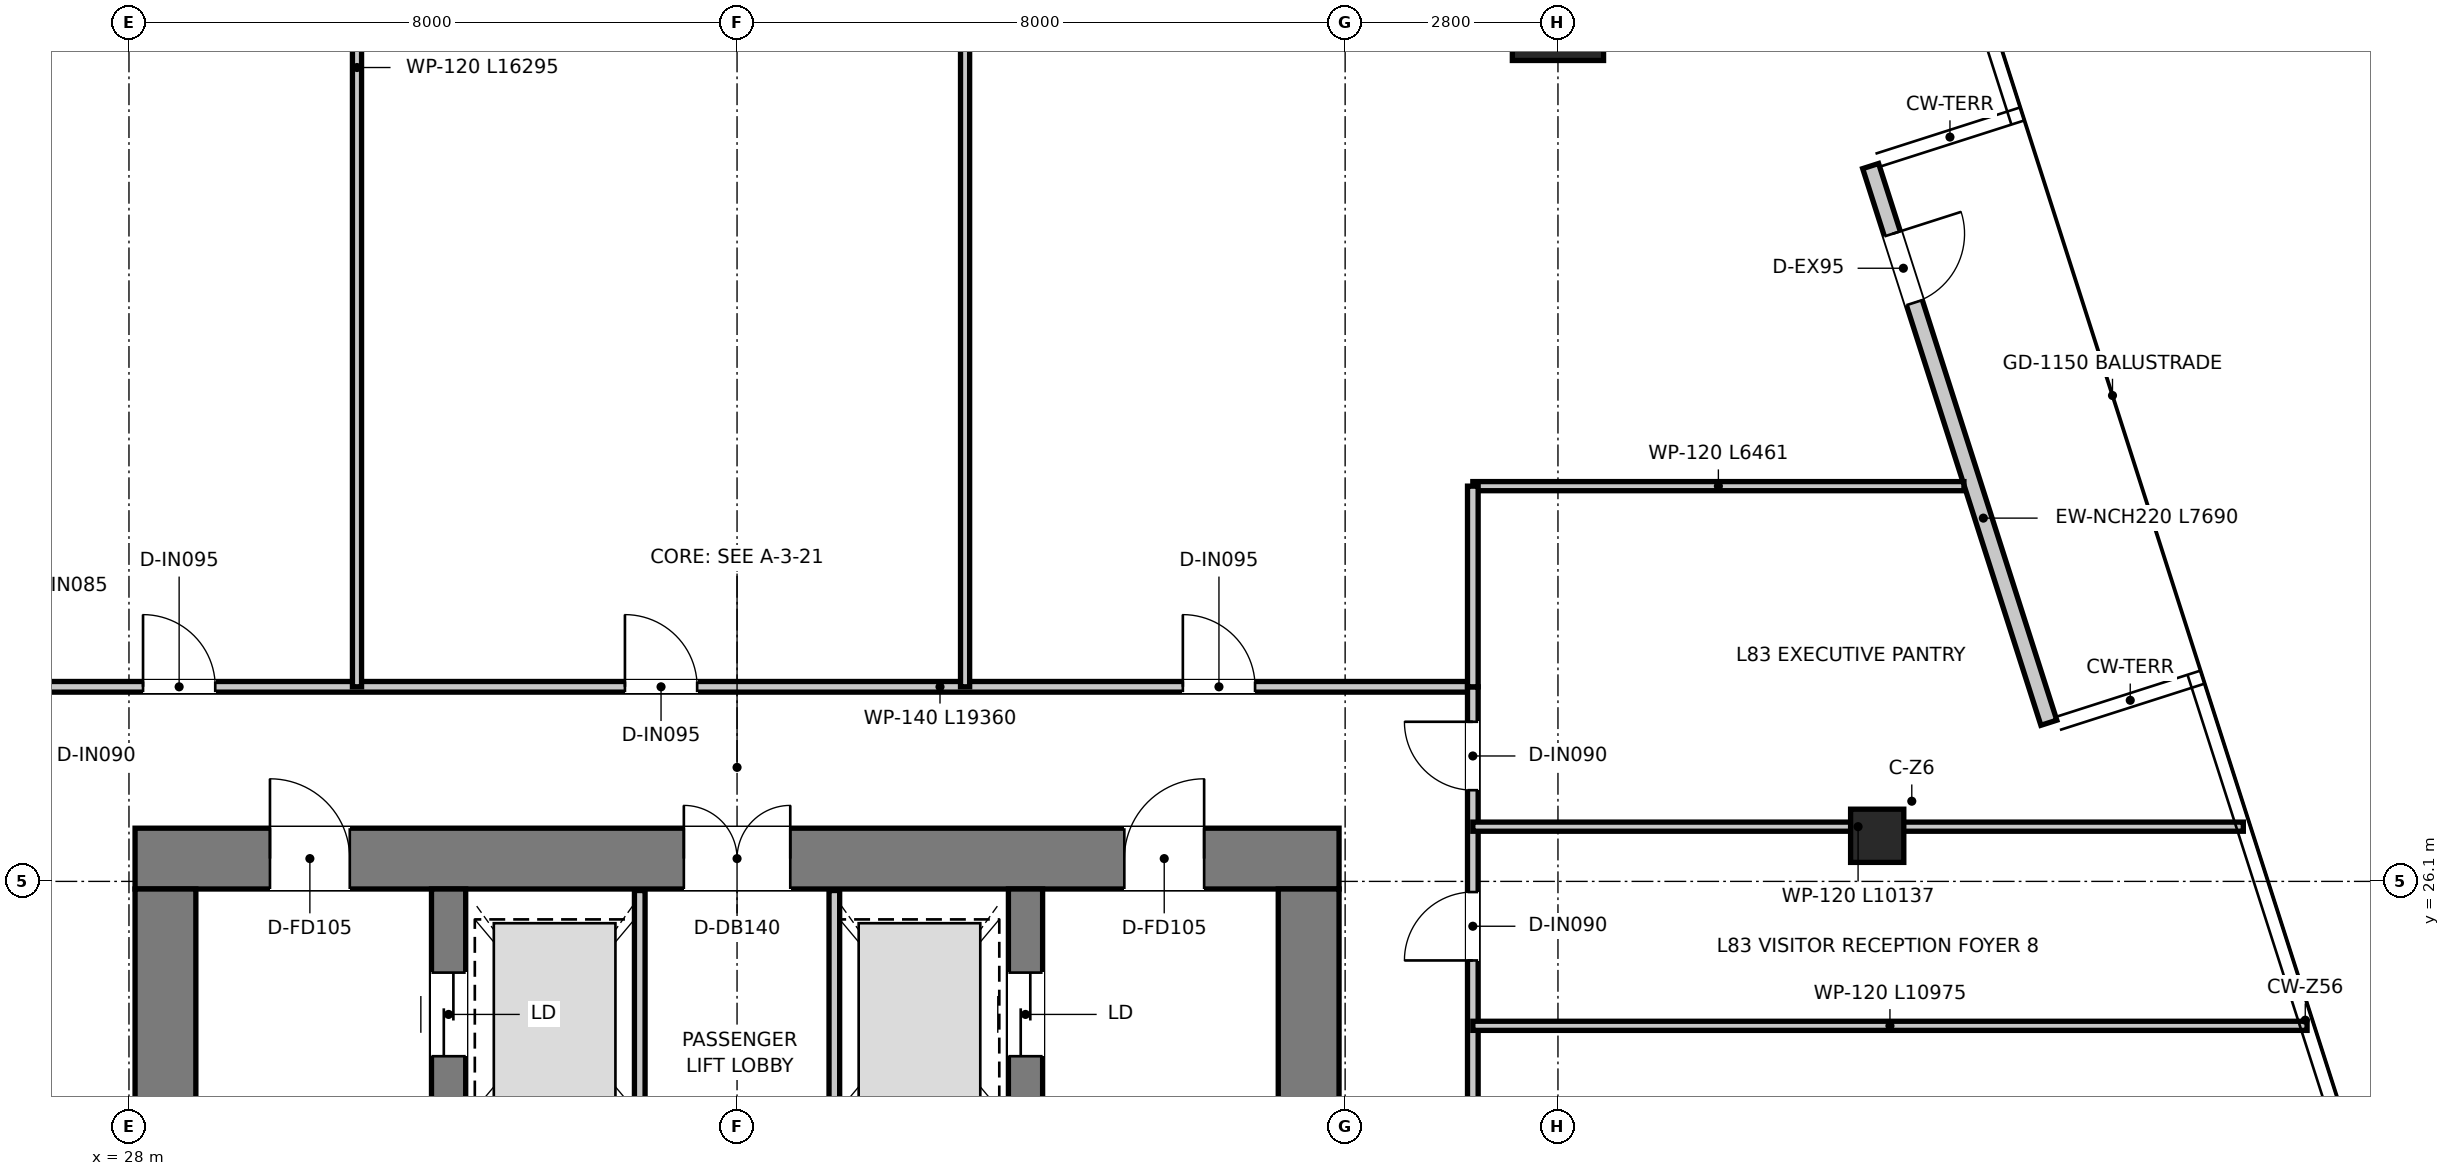
"""IFC4 building model, lengths in metres.
Left out: names, types, materials, properties, quantities, classifications, styles, units other than length and angle.
Written with IfcOpenShell. Run it as: python <this file> out.ifc"""

import sys

from ifc_helpers import new_model, si_unit, direction, frame, frame_2d, origin, origin_2d, place, context, subcontext, project, spatial, rectangle, extrude, source, transform, mapped, element, fill, save


model = new_model("IFC4")
c1 = context("Model", 3, precision=1e-05, world=origin(), true_north=direction((0.0, 1.0)))
c2 = subcontext(c1, "Body", "Model", "MODEL_VIEW")
j1 = project(units=[si_unit("LENGTHUNIT", "METRE"), si_unit("PLANEANGLEUNIT", "RADIAN")], contexts=[c1])
p1 = place(None, origin())
s1 = spatial("IfcSite", under=j1, at=p1, CompositionType="ELEMENT")
p2 = place(p1, origin())
s2 = spatial("IfcBuilding", under=s1, at=p2, CompositionType="ELEMENT")
p3 = place(p2, frame((0.0, 0.0, 339.55)))
s3 = spatial("IfcBuildingStorey", under=s2, at=p3, CompositionType="ELEMENT", Elevation=339.55)
p4 = place(p3, frame((28.08, 26.4, 0.0), z_axis=(0.0, 0.0, 1.0), x_axis=(1.0, 0.0, 0.0)))
e1 = element("IfcWall", 1, at=p4, inside=s3, PredefinedType="SHEAR", context=c2, shape_type="SweptSolid", body=[
    extrude(rectangle(XDim=15.84, YDim=0.8, at=frame_2d((7.92, 0.0))), origin(), (0.0, 0.0, 1.0), 3.95),
])
p5 = place(p4, frame((7.22, 0.0, 0.0)))
e2 = element("IfcOpeningElement", 2, at=p5, cuts=e1, PredefinedType="OPENING", context=c2, shape_type="SweptSolid", body=[
    extrude(rectangle(XDim=1.4, YDim=2.2, at=frame_2d((0.7, 1.1))), frame((0.0, 0.41, 0.0), z_axis=(0.0, -1.0, 0.0), x_axis=(1.0, 0.0, 0.0)), (0.0, 0.0, 1.0), 0.82),
])
p6 = place(p4, frame((1.775, 0.0, 0.0)))
e3 = element("IfcOpeningElement", 3, at=p6, cuts=e1, PredefinedType="OPENING", context=c2, shape_type="SweptSolid", body=[
    extrude(rectangle(XDim=1.05, YDim=2.1, at=frame_2d((0.525, 1.05))), frame((0.0, 0.41, 0.0), z_axis=(0.0, -1.0, 0.0), x_axis=(1.0, 0.0, 0.0)), (0.0, 0.0, 1.0), 0.82),
])
p7 = place(p4, frame((13.015, 0.0, 0.0)))
e4 = element("IfcOpeningElement", 4, at=p7, cuts=e1, PredefinedType="OPENING", context=c2, shape_type="SweptSolid", body=[
    extrude(rectangle(XDim=1.05, YDim=2.1, at=frame_2d((0.525, 1.05))), frame((0.0, 0.41, 0.0), z_axis=(0.0, -1.0, 0.0), x_axis=(1.0, 0.0, 0.0)), (0.0, 0.0, 1.0), 0.82),
])
for number, where, z_axis, x_axis in (
    (5, (28.48, 11.3, 0.0), (0.0, 0.0, 1.0), (0.0, 1.0, 0.0)),
    (6, (43.52, 11.3, 0.0), (0.0, 0.0, 1.0), (0.0, 1.0, 0.0)),
):
    element("IfcWall", number, at=place(p3, frame(where, z_axis=z_axis, x_axis=x_axis)), inside=s3, PredefinedType="SHEAR", context=c2, shape_type="SweptSolid", body=[
        extrude(rectangle(XDim=14.7, YDim=0.8, at=frame_2d((7.35, 0.0))), origin(), (0.0, 0.0, 1.0), 3.95),
    ])
p8 = place(p3, frame((32.205, 13.22, 0.0), z_axis=(0.0, 0.0, 1.0), x_axis=(0.0, 1.0, 0.0)))
e7 = element("IfcWall", 7, at=p8, inside=s3, PredefinedType="SHEAR", context=c2, shape_type="SweptSolid", body=[
    extrude(rectangle(XDim=12.78, YDim=0.45, at=frame_2d((6.39, 0.0))), origin(), (0.0, 0.0, 1.0), 3.95),
])
p9 = place(p8, frame((10.58, 0.0, 0.0)))
e8 = element("IfcOpeningElement", 8, at=p9, cuts=e7, PredefinedType="OPENING", context=c2, shape_type="SweptSolid", body=[
    extrude(rectangle(XDim=1.1, YDim=2.15, at=frame_2d((0.55, 1.075))), frame((0.0, 0.235, 0.0), z_axis=(0.0, -1.0, 0.0), x_axis=(1.0, 0.0, 0.0)), (0.0, 0.0, 1.0), 0.47),
])
p10 = place(p3, frame((39.795, 13.22, 0.0), z_axis=(0.0, 0.0, 1.0), x_axis=(0.0, 1.0, 0.0)))
e9 = element("IfcWall", 9, at=p10, inside=s3, PredefinedType="SHEAR", context=c2, shape_type="SweptSolid", body=[
    extrude(rectangle(XDim=12.78, YDim=0.45, at=frame_2d((6.39, 0.0))), origin(), (0.0, 0.0, 1.0), 3.95),
])
p11 = place(p10, frame((10.58, 0.0, 0.0)))
e10 = element("IfcOpeningElement", 10, at=p11, cuts=e9, PredefinedType="OPENING", context=c2, shape_type="SweptSolid", body=[
    extrude(rectangle(XDim=1.1, YDim=2.15, at=frame_2d((0.55, 1.075))), frame((0.0, 0.235, 0.0), z_axis=(0.0, -1.0, 0.0), x_axis=(1.0, 0.0, 0.0)), (0.0, 0.0, 1.0), 0.47),
])
m1 = source(origin(), c2, "Body", "SweptSolid", [
    extrude(rectangle(XDim=1.2, YDim=1.2, at=origin_2d()), origin(), (0.0, 0.0, 1.0), 3.95),
])
p12 = place(p3, frame((46.8, 37.5, 0.0), z_axis=(0.0, 0.0, 1.0), x_axis=(1.0, 0.0, 0.0)))
e11 = element("IfcColumn", 11, at=p12, inside=s3, PredefinedType="USERDEFINED", context=c2, shape_type="MappedRepresentation", body=[
    mapped(m1, transform((0.0, 0.0, 0.0), x_axis=(1.0, 0.0, 0.0), y_axis=(0.0, 1.0, 0.0), z_axis=(0.0, 0.0, 1.0), scale=1.0)),
])
m2 = source(origin(), c2, "Body", "SweptSolid", [
    extrude(rectangle(XDim=0.7, YDim=0.7, at=origin_2d()), origin(), (0.0, 0.0, 1.0), 3.95),
])
p13 = place(p3, frame((51.0, 26.7, 0.0), z_axis=(0.0, 0.0, 1.0), x_axis=(1.0, 0.0, 0.0)))
e12 = element("IfcColumn", 12, at=p13, inside=s3, PredefinedType="COLUMN", context=c2, shape_type="MappedRepresentation", body=[
    mapped(m2, transform((0.0, 0.0, 0.0), x_axis=(1.0, 0.0, 0.0), y_axis=(0.0, 1.0, 0.0), z_axis=(0.0, 0.0, 1.0), scale=1.0)),
])
p14 = place(p3, frame((50.914, 35.511, 0.0), z_axis=(0.0, 0.0, 1.0), x_axis=(0.304842539612, -0.952402764613, 0.0)))
e13 = element("IfcWall", 13, at=p14, inside=s3, PredefinedType="ELEMENTEDWALL", context=c2, shape_type="SweptSolid", body=[
    extrude(rectangle(XDim=7.69, YDim=0.22, at=frame_2d((3.845, 0.0))), origin(), (0.0, 0.0, 1.0), 3.38),
])
p15 = place(p14, frame((0.937, 0.0, 0.0)))
e14 = element("IfcOpeningElement", 14, at=p15, cuts=e13, PredefinedType="OPENING", context=c2, shape_type="SweptSolid", body=[
    extrude(rectangle(XDim=0.95, YDim=2.1, at=frame_2d((0.475, 1.05))), frame((0.0, 0.12, 0.0), z_axis=(0.0, -1.0, 0.0), x_axis=(1.0, 0.0, 0.0)), (0.0, 0.0, 1.0), 0.24),
])
p16 = place(p3, frame((34.72, 20.2, 0.0), z_axis=(0.0, 0.0, 1.0), x_axis=(0.0, 1.0, 0.0)))
e15 = element("IfcWall", 15, at=p16, inside=s3, PredefinedType="PARTITIONING", context=c2, shape_type="SweptSolid", body=[
    extrude(rectangle(XDim=5.78, YDim=0.14, at=frame_2d((2.89, 0.0))), origin(), (0.0, 0.0, 1.0), 2.82),
])
p17 = place(p16, frame((1.05, 0.0, 0.0)))
e16 = element("IfcOpeningElement", 16, at=p17, cuts=e15, PredefinedType="OPENING", context=c2, shape_type="SweptSolid", body=[
    extrude(rectangle(XDim=0.9, YDim=2.1, at=frame_2d((0.45, 1.05))), frame((0.0, 0.08, 0.0), z_axis=(0.0, -1.0, 0.0), x_axis=(1.0, 0.0, 0.0)), (0.0, 0.0, 1.0), 0.16),
])
p18 = place(p3, frame((37.28, 20.2, 0.0), z_axis=(0.0, 0.0, 1.0), x_axis=(0.0, 1.0, 0.0)))
e17 = element("IfcWall", 17, at=p18, inside=s3, PredefinedType="PARTITIONING", context=c2, shape_type="SweptSolid", body=[
    extrude(rectangle(XDim=5.78, YDim=0.14, at=frame_2d((2.89, 0.0))), origin(), (0.0, 0.0, 1.0), 2.82),
])
p19 = place(p18, frame((0.95, 0.0, 0.0)))
e18 = element("IfcOpeningElement", 18, at=p19, cuts=e17, PredefinedType="OPENING", context=c2, shape_type="SweptSolid", body=[
    extrude(rectangle(XDim=1.1, YDim=2.15, at=frame_2d((0.55, 1.075))), frame((0.0, 0.08, 0.0), z_axis=(0.0, -1.0, 0.0), x_axis=(1.0, 0.0, 0.0)), (0.0, 0.0, 1.0), 0.16),
])
p20 = place(p3, frame((26.32, 28.66, 0.0), z_axis=(0.0, 0.0, 1.0), x_axis=(1.0, 0.0, 0.0)))
e19 = element("IfcWall", 19, at=p20, inside=s3, PredefinedType="PARTITIONING", context=c2, shape_type="SweptSolid", body=[
    extrude(rectangle(XDim=19.36, YDim=0.14, at=frame_2d((9.68, 0.0))), origin(), (0.0, 0.0, 1.0), 3.18),
])
p21 = place(p20, frame((1.865, 0.0, 0.0)))
e20 = element("IfcOpeningElement", 20, at=p21, cuts=e19, PredefinedType="OPENING", context=c2, shape_type="SweptSolid", body=[
    extrude(rectangle(XDim=0.95, YDim=2.1, at=frame_2d((0.475, 1.05))), frame((0.0, 0.08, 0.0), z_axis=(0.0, -1.0, 0.0), x_axis=(1.0, 0.0, 0.0)), (0.0, 0.0, 1.0), 0.16),
])
p22 = place(p20, frame((8.205, 0.0, 0.0)))
e21 = element("IfcOpeningElement", 21, at=p22, cuts=e19, PredefinedType="OPENING", context=c2, shape_type="SweptSolid", body=[
    extrude(rectangle(XDim=0.95, YDim=2.1, at=frame_2d((0.475, 1.05))), frame((0.0, 0.08, 0.0), z_axis=(0.0, -1.0, 0.0), x_axis=(1.0, 0.0, 0.0)), (0.0, 0.0, 1.0), 0.16),
])
p23 = place(p20, frame((15.545, 0.0, 0.0)))
e22 = element("IfcOpeningElement", 22, at=p23, cuts=e19, PredefinedType="OPENING", context=c2, shape_type="SweptSolid", body=[
    extrude(rectangle(XDim=0.95, YDim=2.1, at=frame_2d((0.475, 1.05))), frame((0.0, 0.08, 0.0), z_axis=(0.0, -1.0, 0.0), x_axis=(1.0, 0.0, 0.0)), (0.0, 0.0, 1.0), 0.16),
])
p24 = place(p3, frame((45.68, 13.0, 0.0), z_axis=(0.0, 0.0, 1.0), x_axis=(0.0, 1.0, 0.0)))
e23 = element("IfcWall", 23, at=p24, inside=s3, PredefinedType="PARTITIONING", context=c2, shape_type="SweptSolid", body=[
    extrude(rectangle(XDim=15.66, YDim=0.14, at=frame_2d((7.83, 0.0))), origin(), (0.0, 0.0, 1.0), 3.13),
])
p25 = place(p24, frame((14.3, 0.0, 0.0)))
e24 = element("IfcOpeningElement", 24, at=p25, cuts=e23, PredefinedType="OPENING", context=c2, shape_type="SweptSolid", body=[
    extrude(rectangle(XDim=0.9, YDim=2.1, at=frame_2d((0.45, 1.05))), frame((0.0, 0.08, 0.0), z_axis=(0.0, -1.0, 0.0), x_axis=(1.0, 0.0, 0.0)), (0.0, 0.0, 1.0), 0.16),
])
p26 = place(p24, frame((4.9, 0.0, 0.0)))
e25 = element("IfcOpeningElement", 25, at=p26, cuts=e23, PredefinedType="OPENING", context=c2, shape_type="SweptSolid", body=[
    extrude(rectangle(XDim=0.9, YDim=2.1, at=frame_2d((0.45, 1.05))), frame((0.0, 0.08, 0.0), z_axis=(0.0, -1.0, 0.0), x_axis=(1.0, 0.0, 0.0)), (0.0, 0.0, 1.0), 0.16),
])
p27 = place(p24, frame((8.25, 0.0, 0.0)))
e26 = element("IfcOpeningElement", 26, at=p27, cuts=e23, PredefinedType="OPENING", context=c2, shape_type="SweptSolid", body=[
    extrude(rectangle(XDim=0.9, YDim=2.1, at=frame_2d((0.45, 1.05))), frame((0.0, 0.08, 0.0), z_axis=(0.0, -1.0, 0.0), x_axis=(1.0, 0.0, 0.0)), (0.0, 0.0, 1.0), 0.16),
])
p28 = place(p24, frame((12.06, 0.0, 0.0)))
e27 = element("IfcOpeningElement", 27, at=p28, cuts=e23, PredefinedType="OPENING", context=c2, shape_type="SweptSolid", body=[
    extrude(rectangle(XDim=0.9, YDim=2.1, at=frame_2d((0.45, 1.05))), frame((0.0, 0.08, 0.0), z_axis=(0.0, -1.0, 0.0), x_axis=(1.0, 0.0, 0.0)), (0.0, 0.0, 1.0), 0.16),
])
p29 = place(p3, frame((45.68, 26.82, 0.0), z_axis=(0.0, 0.0, 1.0), x_axis=(1.0, 0.0, 0.0)))
e28 = element("IfcWall", 28, at=p29, inside=s3, PredefinedType="PARTITIONING", context=c2, shape_type="SweptSolid", body=[
    extrude(rectangle(XDim=10.137, YDim=0.12, at=frame_2d((5.068, 0.0))), origin(), (0.0, 0.0, 1.0), 3.13),
])
p30 = place(p3, frame((45.68, 31.3, 0.0), z_axis=(0.0, 0.0, 1.0), x_axis=(1.0, 0.0, 0.0)))
e29 = element("IfcWall", 29, at=p30, inside=s3, PredefinedType="PARTITIONING", context=c2, shape_type="SweptSolid", body=[
    extrude(rectangle(XDim=6.461, YDim=0.12, at=frame_2d((3.23, 0.0))), origin(), (0.0, 0.0, 1.0), 3.13),
])
p31 = place(p3, frame((45.68, 28.66, 0.0), z_axis=(0.0, 0.0, 1.0), x_axis=(0.0, 1.0, 0.0)))
e30 = element("IfcWall", 30, at=p31, inside=s3, PredefinedType="PARTITIONING", context=c2, shape_type="SweptSolid", body=[
    extrude(rectangle(XDim=2.64, YDim=0.14, at=frame_2d((1.32, 0.0))), origin(), (0.0, 0.0, 1.0), 3.43),
])
p32 = place(p3, frame((31.0, 28.66, 0.0), z_axis=(0.0, 0.0, 1.0), x_axis=(0.0, 1.0, 0.0)))
e31 = element("IfcWall", 31, at=p32, inside=s3, PredefinedType="PARTITIONING", context=c2, shape_type="SweptSolid", body=[
    extrude(rectangle(XDim=16.295, YDim=0.12, at=frame_2d((8.147, 0.0))), origin(), (0.0, 0.0, 1.0), 3.13),
])
p33 = place(p3, frame((39.0, 28.66, 0.0), z_axis=(0.0, 0.0, 1.0), x_axis=(0.0, 1.0, 0.0)))
e32 = element("IfcWall", 32, at=p33, inside=s3, PredefinedType="PARTITIONING", context=c2, shape_type="SweptSolid", body=[
    extrude(rectangle(XDim=18.855, YDim=0.12, at=frame_2d((9.428, 0.0))), origin(), (0.0, 0.0, 1.0), 3.13),
])
p34 = place(p3, frame((45.68, 24.2, 0.0), z_axis=(0.0, 0.0, 1.0), x_axis=(1.0, 0.0, 0.0)))
e33 = element("IfcWall", 33, at=p34, inside=s3, PredefinedType="PARTITIONING", context=c2, shape_type="SweptSolid", body=[
    extrude(rectangle(XDim=10.976, YDim=0.12, at=frame_2d((5.488, 0.0))), origin(), (0.0, 0.0, 1.0), 3.13),
])
p35 = place(p5, origin())
e34 = element("IfcDoor", 34, at=p35, inside=s3, OperationType="DOUBLE_DOOR_SINGLE_SWING", PredefinedType="DOOR", context=c2, shape_type="SweptSolid", body=[
    extrude(rectangle(XDim=1.4, YDim=2.2, at=frame_2d((0.7, 1.1))), frame((0.0, 0.025, 0.0), z_axis=(0.0, -1.0, 0.0), x_axis=(1.0, 0.0, 0.0)), (0.0, 0.0, 1.0), 0.05),
])
fill(e2, e34)
p36 = place(p6, origin())
e35 = element("IfcDoor", 35, at=p36, inside=s3, OperationType="SINGLE_SWING_LEFT", PredefinedType="DOOR", context=c2, shape_type="SweptSolid", body=[
    extrude(rectangle(XDim=1.05, YDim=2.1, at=frame_2d((0.525, 1.05))), frame((0.0, 0.025, 0.0), z_axis=(0.0, -1.0, 0.0), x_axis=(1.0, 0.0, 0.0)), (0.0, 0.0, 1.0), 0.05),
])
fill(e3, e35)
p37 = place(p7, origin())
e36 = element("IfcDoor", 36, at=p37, inside=s3, OperationType="SINGLE_SWING_RIGHT", PredefinedType="DOOR", context=c2, shape_type="SweptSolid", body=[
    extrude(rectangle(XDim=1.05, YDim=2.1, at=frame_2d((0.525, 1.05))), frame((0.0, 0.025, 0.0), z_axis=(0.0, -1.0, 0.0), x_axis=(1.0, 0.0, 0.0)), (0.0, 0.0, 1.0), 0.05),
])
fill(e4, e36)
p38 = place(p9, origin())
e37 = element("IfcDoor", 37, at=p38, inside=s3, OperationType="DOUBLE_DOOR_SLIDING", PredefinedType="DOOR", context=c2, shape_type="SweptSolid", body=[
    extrude(rectangle(XDim=1.1, YDim=2.15, at=frame_2d((0.55, 1.075))), frame((0.0, 0.025, 0.0), z_axis=(0.0, -1.0, 0.0), x_axis=(1.0, 0.0, 0.0)), (0.0, 0.0, 1.0), 0.05),
])
fill(e8, e37)
p39 = place(p11, origin())
e38 = element("IfcDoor", 38, at=p39, inside=s3, OperationType="DOUBLE_DOOR_SLIDING", PredefinedType="DOOR", context=c2, shape_type="SweptSolid", body=[
    extrude(rectangle(XDim=1.1, YDim=2.15, at=frame_2d((0.55, 1.075))), frame((0.0, 0.025, 0.0), z_axis=(0.0, -1.0, 0.0), x_axis=(1.0, 0.0, 0.0)), (0.0, 0.0, 1.0), 0.05),
])
fill(e10, e38)
p40 = place(p25, origin())
e39 = element("IfcDoor", 39, at=p40, inside=s3, OperationType="SINGLE_SWING_RIGHT", PredefinedType="DOOR", context=c2, shape_type="SweptSolid", body=[
    extrude(rectangle(XDim=0.9, YDim=2.1, at=frame_2d((0.45, 1.05))), frame((0.0, 0.025, 0.0), z_axis=(0.0, -1.0, 0.0), x_axis=(1.0, 0.0, 0.0)), (0.0, 0.0, 1.0), 0.05),
])
fill(e24, e39)
p41 = place(p21, origin())
e40 = element("IfcDoor", 40, at=p41, inside=s3, OperationType="SINGLE_SWING_LEFT", PredefinedType="DOOR", context=c2, shape_type="SweptSolid", body=[
    extrude(rectangle(XDim=0.95, YDim=2.1, at=frame_2d((0.475, 1.05))), frame((0.0, 0.025, 0.0), z_axis=(0.0, -1.0, 0.0), x_axis=(1.0, 0.0, 0.0)), (0.0, 0.0, 1.0), 0.05),
])
fill(e20, e40)
p42 = place(p22, origin())
e41 = element("IfcDoor", 41, at=p42, inside=s3, OperationType="SINGLE_SWING_LEFT", PredefinedType="DOOR", context=c2, shape_type="SweptSolid", body=[
    extrude(rectangle(XDim=0.95, YDim=2.1, at=frame_2d((0.475, 1.05))), frame((0.0, 0.025, 0.0), z_axis=(0.0, -1.0, 0.0), x_axis=(1.0, 0.0, 0.0)), (0.0, 0.0, 1.0), 0.05),
])
fill(e21, e41)
p43 = place(p23, origin())
e42 = element("IfcDoor", 42, at=p43, inside=s3, OperationType="SINGLE_SWING_LEFT", PredefinedType="DOOR", context=c2, shape_type="SweptSolid", body=[
    extrude(rectangle(XDim=0.95, YDim=2.1, at=frame_2d((0.475, 1.05))), frame((0.0, 0.025, 0.0), z_axis=(0.0, -1.0, 0.0), x_axis=(1.0, 0.0, 0.0)), (0.0, 0.0, 1.0), 0.05),
])
fill(e22, e42)
p44 = place(p28, origin())
e43 = element("IfcDoor", 43, at=p44, inside=s3, OperationType="SINGLE_SWING_LEFT", PredefinedType="DOOR", context=c2, shape_type="SweptSolid", body=[
    extrude(rectangle(XDim=0.9, YDim=2.1, at=frame_2d((0.45, 1.05))), frame((0.0, 0.025, 0.0), z_axis=(0.0, -1.0, 0.0), x_axis=(1.0, 0.0, 0.0)), (0.0, 0.0, 1.0), 0.05),
])
fill(e27, e43)
p45 = place(p15, origin())
e44 = element("IfcDoor", 44, at=p45, inside=s3, OperationType="SINGLE_SWING_LEFT", PredefinedType="DOOR", context=c2, shape_type="SweptSolid", body=[
    extrude(rectangle(XDim=0.95, YDim=2.1, at=frame_2d((0.475, 1.05))), frame((0.0, 0.025, 0.0), z_axis=(0.0, -1.0, 0.0), x_axis=(1.0, 0.0, 0.0)), (0.0, 0.0, 1.0), 0.05),
])
fill(e14, e44)
save(model, sys.argv[1])
